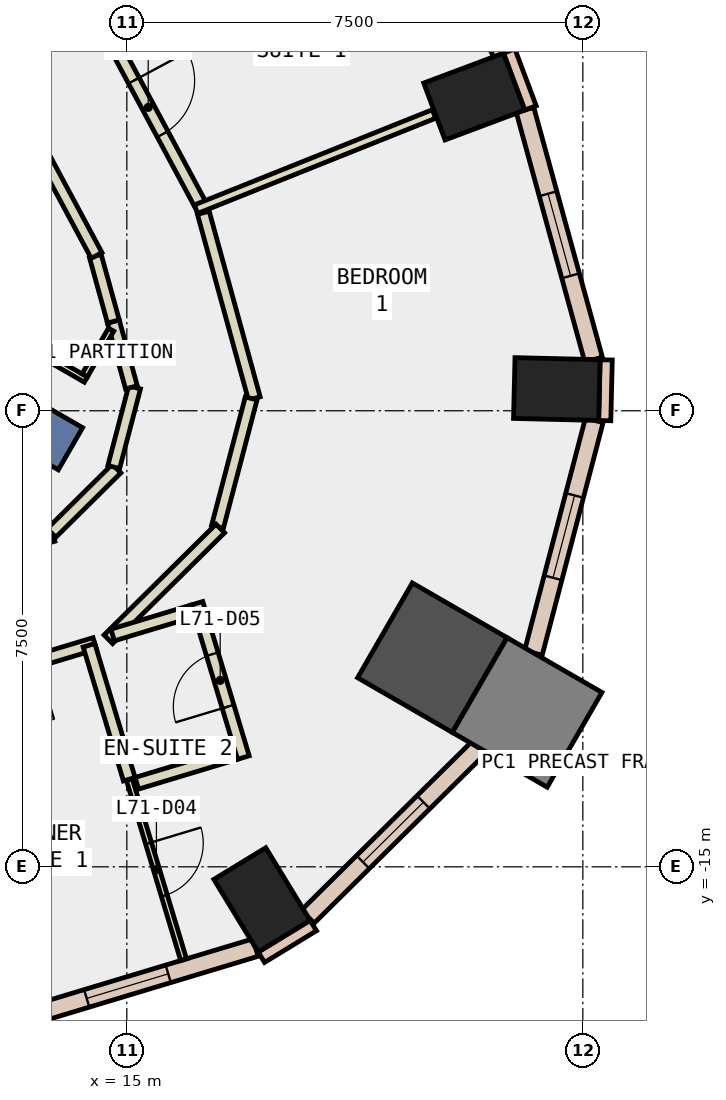
"""IFC4 building model, lengths in metres.
Left out: names, types, materials, properties, quantities, classifications, styles, units other than length and angle.
Written with IfcOpenShell. Run it as: python <this file> out.ifc"""

import sys

from ifc_helpers import new_model, si_unit, direction, frame, frame_2d, origin, origin_2d, place, context, subcontext, project, spatial, rectangle, extrude, element, fill, save


model = new_model("IFC4")
c1 = context("Model", 3, precision=1e-05, world=origin(), true_north=direction((0.0, 1.0)))
c2 = subcontext(c1, "Body", "Model", "MODEL_VIEW")
j1 = project(units=[si_unit("LENGTHUNIT", "METRE"), si_unit("PLANEANGLEUNIT", "RADIAN")], contexts=[c1])
p1 = place(None, origin())
s1 = spatial("IfcSite", under=j1, at=p1, CompositionType="ELEMENT")
p2 = place(p1, origin())
s2 = spatial("IfcBuilding", under=s1, at=p2, CompositionType="ELEMENT")
p3 = place(p2, frame((0.0, 0.0, 304.4)))
s3 = spatial("IfcBuildingStorey", under=s2, at=p3, CompositionType="ELEMENT", Elevation=304.4)
p4 = place(p3, frame((17.223, -15.544, -0.34), z_axis=(0.0, 0.0, 1.0), x_axis=(0.853650808213, 0.520845752251, 0.0)))
e1 = element("IfcColumn", 1, at=p4, inside=s3, PredefinedType="COLUMN", context=c2, shape_type="SweptSolid", body=[
    extrude(rectangle(XDim=1.0, YDim=1.4, at=origin_2d()), origin(), (0.0, 0.0, 1.0), 3.6),
])
p5 = place(p3, frame((20.025, -11.561, -0.34), z_axis=(0.0, 0.0, 1.0), x_axis=(-0.866025403784, 0.5, 0.0)))
e2 = element("IfcColumn", 2, at=p5, inside=s3, PredefinedType="COLUMN", context=c2, shape_type="SweptSolid", body=[
    extrude(rectangle(XDim=1.8, YDim=1.8, at=origin_2d()), origin(), (0.0, 0.0, 1.0), 3.6),
])
for number, where, z_axis, x_axis in (
    (3, (22.072, -7.143, -0.34), (0.0, 0.0, 1.0), (0.024, 1.0, 0.0)),
    (4, (20.714, -2.333, -0.34), (0.0, 0.0, 1.0), (-0.351, 0.936, 0.0)),
):
    element("IfcColumn", number, at=place(p3, frame(where, z_axis=z_axis, x_axis=x_axis)), inside=s3, PredefinedType="COLUMN", context=c2, shape_type="SweptSolid", body=[
        extrude(rectangle(XDim=1.0, YDim=1.4, at=origin_2d()), origin(), (0.0, 0.0, 1.0), 3.6),
    ])
p6 = place(p3, frame((21.584, -12.461, -0.34), z_axis=(0.0, 0.0, 1.0), x_axis=(-0.866025403784, 0.5, 0.0)))
e5 = element("IfcColumn", 5, at=p6, inside=s3, PredefinedType="COLUMN", context=c2, shape_type="SweptSolid", body=[
    extrude(rectangle(XDim=1.8, YDim=1.8, at=origin_2d()), origin(), (0.0, 0.0, 1.0), 3.6),
])
p7 = place(p3, frame((6.279, -3.625, -0.34), z_axis=(0.0, 0.0, 1.0), x_axis=(0.866017533419, -0.500013631625, 0.0)))
e6 = element("IfcWall", 6, at=p7, inside=s3, PredefinedType="SHEAR", context=c2, shape_type="SweptSolid", body=[
    extrude(rectangle(XDim=9.0, YDim=0.8, at=frame_2d((4.5, 0.0))), origin(), (0.0, 0.0, 1.0), 3.6),
])
p8 = place(p3, frame((21.639, -2.52, 0.0), z_axis=(0.0, 0.0, 1.0), x_axis=(-0.350962844851, 0.936389385637, 0.0)))
e7 = element("IfcWall", 7, at=p8, inside=s3, PredefinedType="STANDARD", context=c2, shape_type="SweptSolid", body=[
    extrude(rectangle(XDim=1.0, YDim=0.2, at=frame_2d((0.5, 0.0))), origin(), (0.0, 0.0, 1.0), 3.26),
])
p9 = place(p3, frame((17.213, -16.487, 0.0), z_axis=(0.0, 0.0, 1.0), x_axis=(0.853679739553, 0.520798331677, 0.0)))
e8 = element("IfcWall", 8, at=p9, inside=s3, PredefinedType="STANDARD", context=c2, shape_type="SweptSolid", body=[
    extrude(rectangle(XDim=1.0, YDim=0.2, at=frame_2d((0.5, 0.0))), origin(), (0.0, 0.0, 1.0), 3.26),
])
p10 = place(p3, frame((22.86, -7.662, 0.0), z_axis=(0.0, 0.0, 1.0), x_axis=(0.023942303888, 0.999713341956, 0.0)))
e9 = element("IfcWall", 9, at=p10, inside=s3, PredefinedType="STANDARD", context=c2, shape_type="SweptSolid", body=[
    extrude(rectangle(XDim=0.999, YDim=0.2, at=frame_2d((0.5, 0.0))), origin(), (0.0, 0.0, 1.0), 3.26),
])
p11 = place(p3, frame((12.904, -17.596, 0.0), z_axis=(0.0, 0.0, 1.0), x_axis=(0.957563190743, 0.288223412884, 0.0)))
e10 = element("IfcWall", 10, at=p11, inside=s3, PredefinedType="STANDARD", context=c2, shape_type="SweptSolid", body=[
    extrude(rectangle(XDim=4.4, YDim=0.3, at=frame_2d((2.2, 0.0))), origin(), (0.0, 0.0, 1.0), 3.26),
])
p12 = place(p11, frame((1.5, 0.0, 0.9)))
e11 = element("IfcOpeningElement", 11, at=p12, cuts=e10, PredefinedType="OPENING", context=c2, shape_type="SweptSolid", body=[
    extrude(rectangle(XDim=1.4, YDim=2.0, at=frame_2d((0.7, 1.0))), frame((0.0, 0.16, 0.0), z_axis=(0.0, -1.0, 0.0), x_axis=(1.0, 0.0, 0.0)), (0.0, 0.0, 1.0), 0.32),
])
p13 = place(p3, frame((17.976, -15.82, 0.0), z_axis=(0.0, 0.0, 1.0), x_axis=(0.710893699296, 0.703299472701, 0.0)))
e12 = element("IfcWall", 12, at=p13, inside=s3, PredefinedType="STANDARD", context=c2, shape_type="SweptSolid", body=[
    extrude(rectangle(XDim=3.954, YDim=0.3, at=frame_2d((1.977, 0.0))), origin(), (0.0, 0.0, 1.0), 3.26),
])
p14 = place(p13, frame((1.277, 0.0, 0.9)))
e13 = element("IfcOpeningElement", 13, at=p14, cuts=e12, PredefinedType="OPENING", context=c2, shape_type="SweptSolid", body=[
    extrude(rectangle(XDim=1.4, YDim=2.0, at=frame_2d((0.7, 1.0))), frame((0.0, 0.16, 0.0), z_axis=(0.0, -1.0, 0.0), x_axis=(1.0, 0.0, 0.0)), (0.0, 0.0, 1.0), 0.32),
])
p15 = place(p3, frame((21.686, -11.482, 0.0), z_axis=(0.0, 0.0, 1.0), x_axis=(0.253402039956, 0.96736105263, 0.0)))
e14 = element("IfcWall", 14, at=p15, inside=s3, PredefinedType="STANDARD", context=c2, shape_type="SweptSolid", body=[
    extrude(rectangle(XDim=3.954, YDim=0.3, at=frame_2d((1.977, 0.0))), origin(), (0.0, 0.0, 1.0), 3.26),
])
p16 = place(p15, frame((1.277, 0.0, 0.9)))
e15 = element("IfcOpeningElement", 15, at=p16, cuts=e14, PredefinedType="OPENING", context=c2, shape_type="SweptSolid", body=[
    extrude(rectangle(XDim=1.4, YDim=2.0, at=frame_2d((0.7, 1.0))), frame((0.0, 0.16, 0.0), z_axis=(0.0, -1.0, 0.0), x_axis=(1.0, 0.0, 0.0)), (0.0, 0.0, 1.0), 0.32),
])
p17 = place(p3, frame((22.677, -6.659, 0.0), z_axis=(0.0, 0.0, 1.0), x_axis=(-0.264892613927, 0.964277917971, 0.0)))
e16 = element("IfcWall", 16, at=p17, inside=s3, PredefinedType="STANDARD", context=c2, shape_type="SweptSolid", body=[
    extrude(rectangle(XDim=4.258, YDim=0.3, at=frame_2d((2.129, 0.0))), origin(), (0.0, 0.0, 1.0), 3.26),
])
p18 = place(p17, frame((1.429, 0.0, 0.9)))
e17 = element("IfcOpeningElement", 17, at=p18, cuts=e16, PredefinedType="OPENING", context=c2, shape_type="SweptSolid", body=[
    extrude(rectangle(XDim=1.4, YDim=2.0, at=frame_2d((0.7, 1.0))), frame((0.0, 0.16, 0.0), z_axis=(0.0, -1.0, 0.0), x_axis=(1.0, 0.0, 0.0)), (0.0, 0.0, 1.0), 0.32),
])
p19 = place(p3, frame((21.177, -1.626, 0.0), z_axis=(0.0, 0.0, 1.0), x_axis=(-0.473225522632, 0.880941317415, 0.0)))
e18 = element("IfcWall", 18, at=p19, inside=s3, PredefinedType="STANDARD", context=c2, shape_type="SweptSolid", body=[
    extrude(rectangle(XDim=7.345, YDim=0.3, at=frame_2d((3.673, 0.0))), origin(), (0.0, 0.0, 1.0), 3.26),
])
p20 = place(p19, frame((0.736, 0.0, 0.9)))
e19 = element("IfcOpeningElement", 19, at=p20, cuts=e18, PredefinedType="OPENING", context=c2, shape_type="SweptSolid", body=[
    extrude(rectangle(XDim=2.2, YDim=2.0, at=frame_2d((1.1, 1.0))), frame((0.0, 0.16, 0.0), z_axis=(0.0, -1.0, 0.0), x_axis=(1.0, 0.0, 0.0)), (0.0, 0.0, 1.0), 0.32),
])
p21 = place(p19, frame((4.409, 0.0, 0.9)))
e20 = element("IfcOpeningElement", 20, at=p21, cuts=e18, PredefinedType="OPENING", context=c2, shape_type="SweptSolid", body=[
    extrude(rectangle(XDim=2.2, YDim=2.0, at=frame_2d((1.1, 1.0))), frame((0.0, 0.16, 0.0), z_axis=(0.0, -1.0, 0.0), x_axis=(1.0, 0.0, 0.0)), (0.0, 0.0, 1.0), 0.32),
])
p22 = place(p3, frame((11.286, -10.303, 0.0), z_axis=(0.0, 0.0, 1.0), x_axis=(0.957555754851, 0.288248115955, 0.0)))
e21 = element("IfcWall", 21, at=p22, inside=s3, PredefinedType="PARTITIONING", context=c2, shape_type="SweptSolid", body=[
    extrude(rectangle(XDim=2.612, YDim=0.2, at=frame_2d((1.306, 0.0))), origin(), (0.0, 0.0, 1.0), 3.26),
])
p23 = place(p3, frame((13.762, -9.509, 0.0), z_axis=(0.0, 0.0, 1.0), x_axis=(0.710749293824, 0.703445407497, 0.0)))
e22 = element("IfcWall", 22, at=p23, inside=s3, PredefinedType="PARTITIONING", context=c2, shape_type="SweptSolid", body=[
    extrude(rectangle(XDim=1.504, YDim=0.2, at=frame_2d((0.752, 0.0))), origin(), (0.0, 0.0, 1.0), 3.26),
])
p24 = place(p3, frame((14.785, -8.425, 0.0), z_axis=(0.0, 0.0, 1.0), x_axis=(0.253295121261, 0.967389053869, 0.0)))
e23 = element("IfcWall", 23, at=p24, inside=s3, PredefinedType="PARTITIONING", context=c2, shape_type="SweptSolid", body=[
    extrude(rectangle(XDim=1.354, YDim=0.2, at=frame_2d((0.677, 0.0))), origin(), (0.0, 0.0, 1.0), 3.26),
])
p25 = place(p3, frame((15.076, -7.115, 0.0), z_axis=(0.0, 0.0, 1.0), x_axis=(-0.264368116744, 0.964421846937, 0.0)))
e24 = element("IfcWall", 24, at=p25, inside=s3, PredefinedType="PARTITIONING", context=c2, shape_type="SweptSolid", body=[
    extrude(rectangle(XDim=1.123, YDim=0.2, at=frame_2d((0.562, 0.0))), origin(), (0.0, 0.0, 1.0), 3.26),
])
p26 = place(p3, frame((14.779, -6.032, 0.0), z_axis=(0.0, 0.0, 1.0), x_axis=(-0.265740072272, 0.964044715762, 0.0)))
e25 = element("IfcWall", 25, at=p26, inside=s3, PredefinedType="PARTITIONING", context=c2, shape_type="SweptSolid", body=[
    extrude(rectangle(XDim=1.118, YDim=0.2, at=frame_2d((0.559, 0.0))), origin(), (0.0, 0.0, 1.0), 3.26),
])
p27 = place(p3, frame((14.503, -4.946, 0.0), z_axis=(0.0, 0.0, 1.0), x_axis=(-0.473101362557, 0.881008002658, 0.0)))
e26 = element("IfcWall", 26, at=p27, inside=s3, PredefinedType="PARTITIONING", context=c2, shape_type="SweptSolid", body=[
    extrude(rectangle(XDim=7.497, YDim=0.2, at=frame_2d((3.749, 0.0))), origin(), (0.0, 0.0, 1.0), 3.26),
])
p28 = place(p27, frame((3.249, 0.0, 0.0)))
e27 = element("IfcOpeningElement", 27, at=p28, cuts=e26, PredefinedType="OPENING", context=c2, shape_type="SweptSolid", body=[
    extrude(rectangle(XDim=1.0, YDim=2.1, at=frame_2d((0.5, 1.05))), frame((0.0, 0.11, 0.0), z_axis=(0.0, -1.0, 0.0), x_axis=(1.0, 0.0, 0.0)), (0.0, 0.0, 1.0), 0.22),
])
p29 = place(p3, frame((14.473, -11.328, 0.0), z_axis=(0.0, 0.0, 1.0), x_axis=(-0.957599689503, -0.288102125406, 0.0)))
e28 = element("IfcWall", 28, at=p29, inside=s3, PredefinedType="PARTITIONING", context=c2, shape_type="SweptSolid", body=[
    extrude(rectangle(XDim=2.999, YDim=0.2, at=frame_2d((1.5, 0.0))), origin(), (0.0, 0.0, 1.0), 3.26),
])
p30 = place(p29, frame((1.0, 0.0, 0.0)))
e29 = element("IfcOpeningElement", 29, at=p30, cuts=e28, PredefinedType="OPENING", context=c2, shape_type="SweptSolid", body=[
    extrude(rectangle(XDim=1.0, YDim=2.1, at=frame_2d((0.5, 1.05))), frame((0.0, 0.11, 0.0), z_axis=(0.0, -1.0, 0.0), x_axis=(1.0, 0.0, 0.0)), (0.0, 0.0, 1.0), 0.22),
])
p31 = place(p3, frame((16.258, -4.244, 0.0), z_axis=(0.0, 0.0, 1.0), x_axis=(0.264930673246, -0.964267462053, 0.0)))
e30 = element("IfcWall", 30, at=p31, inside=s3, PredefinedType="PARTITIONING", context=c2, shape_type="SweptSolid", body=[
    extrude(rectangle(XDim=3.166, YDim=0.2, at=frame_2d((1.583, 0.0))), origin(), (0.0, 0.0, 1.0), 3.26),
])
p32 = place(p3, frame((17.045, -7.297, 0.0), z_axis=(0.0, 0.0, 1.0), x_axis=(-0.253618393349, -0.967304352598, 0.0)))
e31 = element("IfcWall", 31, at=p32, inside=s3, PredefinedType="PARTITIONING", context=c2, shape_type="SweptSolid", body=[
    extrude(rectangle(XDim=2.184, YDim=0.2, at=frame_2d((1.092, 0.0))), origin(), (0.0, 0.0, 1.0), 3.26),
])
p33 = place(p3, frame((16.537, -9.436, 0.0), z_axis=(0.0, 0.0, 1.0), x_axis=(-0.710773151724, -0.703421301063, 0.0)))
e32 = element("IfcWall", 32, at=p33, inside=s3, PredefinedType="PARTITIONING", context=c2, shape_type="SweptSolid", body=[
    extrude(rectangle(XDim=2.59, YDim=0.2, at=frame_2d((1.295, 0.0))), origin(), (0.0, 0.0, 1.0), 3.26),
])
p34 = place(p3, frame((14.461, -0.852, 0.0), z_axis=(0.0, 0.0, 1.0), x_axis=(0.473160180459, -0.88097641491, 0.0)))
e33 = element("IfcWall", 33, at=p34, inside=s3, PredefinedType="PARTITIONING", context=c2, shape_type="SweptSolid", body=[
    extrude(rectangle(XDim=3.766, YDim=0.2, at=frame_2d((1.883, 0.0))), origin(), (0.0, 0.0, 1.0), 3.26),
])
p35 = place(p34, frame((1.383, 0.0, 0.0)))
e34 = element("IfcOpeningElement", 34, at=p35, cuts=e33, PredefinedType="OPENING", context=c2, shape_type="SweptSolid", body=[
    extrude(rectangle(XDim=1.0, YDim=2.1, at=frame_2d((0.5, 1.05))), frame((0.0, 0.11, 0.0), z_axis=(0.0, -1.0, 0.0), x_axis=(1.0, 0.0, 0.0)), (0.0, 0.0, 1.0), 0.22),
])
p36 = place(p3, frame((6.835, -2.662, 0.0), z_axis=(0.0, 0.0, 1.0), x_axis=(0.866023427642, -0.500003422764, 0.0)))
e35 = element("IfcWall", 35, at=p36, inside=s3, PredefinedType="PARTITIONING", context=c2, shape_type="SweptSolid", body=[
    extrude(rectangle(XDim=8.65, YDim=0.1, at=frame_2d((4.325, 0.0))), origin(), (0.0, 0.0, 1.0), 3.26),
])
p37 = place(p3, frame((14.307, -6.919, 0.0), z_axis=(0.0, 0.0, 1.0), x_axis=(0.500305662732, 0.865848857387, 0.0)))
e36 = element("IfcWall", 36, at=p37, inside=s3, PredefinedType="PARTITIONING", context=c2, shape_type="SweptSolid", body=[
    extrude(rectangle(XDim=0.87, YDim=0.1, at=frame_2d((0.435, 0.0))), origin(), (0.0, 0.0, 1.0), 3.26),
])
p38 = place(p3, frame((15.04, -13.559, 0.0), z_axis=(0.0, 0.0, 1.0), x_axis=(0.288337370875, -0.957528882362, 0.0)))
e37 = element("IfcWall", 37, at=p38, inside=s3, PredefinedType="PARTITIONING", context=c2, shape_type="SweptSolid", body=[
    extrude(rectangle(XDim=3.101, YDim=0.1, at=frame_2d((1.55, 0.0))), origin(), (0.0, 0.0, 1.0), 3.26),
])
p39 = place(p38, frame((1.1, 0.0, 0.0)))
e38 = element("IfcOpeningElement", 38, at=p39, cuts=e37, PredefinedType="OPENING", context=c2, shape_type="SweptSolid", body=[
    extrude(rectangle(XDim=0.9, YDim=2.1, at=frame_2d((0.45, 1.05))), frame((0.0, 0.06, 0.0), z_axis=(0.0, -1.0, 0.0), x_axis=(1.0, 0.0, 0.0)), (0.0, 0.0, 1.0), 0.12),
])
p40 = place(p3, frame((14.378, -11.357, 0.0), z_axis=(0.0, 0.0, 1.0), x_axis=(0.287932252498, -0.957650780802, 0.0)))
e39 = element("IfcWall", 39, at=p40, inside=s3, PredefinedType="PARTITIONING", context=c2, shape_type="SweptSolid", body=[
    extrude(rectangle(XDim=2.3, YDim=0.2, at=frame_2d((1.15, 0.0))), origin(), (0.0, 0.0, 1.0), 3.26),
])
p41 = place(p3, frame((15.165, -13.626, 0.0), z_axis=(0.0, 0.0, 1.0), x_axis=(0.957565028189, 0.288217308275, 0.0)))
e40 = element("IfcWall", 40, at=p41, inside=s3, PredefinedType="PARTITIONING", context=c2, shape_type="SweptSolid", body=[
    extrude(rectangle(XDim=1.7, YDim=0.2, at=frame_2d((0.85, 0.0))), origin(), (0.0, 0.0, 1.0), 3.26),
])
p42 = place(p3, frame((16.917, -13.203, 0.0), z_axis=(0.0, 0.0, 1.0), x_axis=(-0.287998855134, 0.957630753183, 0.0)))
e41 = element("IfcWall", 41, at=p42, inside=s3, PredefinedType="PARTITIONING", context=c2, shape_type="SweptSolid", body=[
    extrude(rectangle(XDim=2.649, YDim=0.2, at=frame_2d((1.325, 0.0))), origin(), (0.0, 0.0, 1.0), 3.26),
])
p43 = place(p42, frame((0.875, 0.0, 0.0)))
e42 = element("IfcOpeningElement", 42, at=p43, cuts=e41, PredefinedType="OPENING", context=c2, shape_type="SweptSolid", body=[
    extrude(rectangle(XDim=0.9, YDim=2.1, at=frame_2d((0.45, 1.05))), frame((0.0, 0.11, 0.0), z_axis=(0.0, -1.0, 0.0), x_axis=(1.0, 0.0, 0.0)), (0.0, 0.0, 1.0), 0.22),
])
p44 = place(p3, frame((16.087, -10.79, 0.0), z_axis=(0.0, 0.0, 1.0), x_axis=(-0.957425655367, -0.288679951581, 0.0)))
e43 = element("IfcWall", 43, at=p44, inside=s3, PredefinedType="PARTITIONING", context=c2, shape_type="SweptSolid", body=[
    extrude(rectangle(XDim=1.378, YDim=0.2, at=frame_2d((0.689, 0.0))), origin(), (0.0, 0.0, 1.0), 3.26),
])
p45 = place(p3, frame((16.138, -4.185, 0.0), z_axis=(0.0, 0.0, 1.0), x_axis=(0.928432751736, 0.371500505388, 0.0)))
e44 = element("IfcWall", 44, at=p45, inside=s3, PredefinedType="PARTITIONING", context=c2, shape_type="SweptSolid", body=[
    extrude(rectangle(XDim=4.216, YDim=0.15, at=frame_2d((2.108, 0.0))), origin(), (0.0, 0.0, 1.0), 3.26),
])
p46 = place(p12, origin())
e45 = element("IfcWindow", 45, at=p46, inside=s3, PartitioningType="SINGLE_PANEL", PredefinedType="WINDOW", context=c2, shape_type="SweptSolid", body=[
    extrude(rectangle(XDim=1.4, YDim=2.0, at=frame_2d((0.7, 1.0))), frame((0.0, 0.03, 0.0), z_axis=(0.0, -1.0, 0.0), x_axis=(1.0, 0.0, 0.0)), (0.0, 0.0, 1.0), 0.06),
])
fill(e11, e45)
p47 = place(p14, origin())
e46 = element("IfcWindow", 46, at=p47, inside=s3, PartitioningType="SINGLE_PANEL", PredefinedType="WINDOW", context=c2, shape_type="SweptSolid", body=[
    extrude(rectangle(XDim=1.4, YDim=2.0, at=frame_2d((0.7, 1.0))), frame((0.0, 0.03, 0.0), z_axis=(0.0, -1.0, 0.0), x_axis=(1.0, 0.0, 0.0)), (0.0, 0.0, 1.0), 0.06),
])
fill(e13, e46)
p48 = place(p16, origin())
e47 = element("IfcWindow", 47, at=p48, inside=s3, PartitioningType="SINGLE_PANEL", PredefinedType="WINDOW", context=c2, shape_type="SweptSolid", body=[
    extrude(rectangle(XDim=1.4, YDim=2.0, at=frame_2d((0.7, 1.0))), frame((0.0, 0.03, 0.0), z_axis=(0.0, -1.0, 0.0), x_axis=(1.0, 0.0, 0.0)), (0.0, 0.0, 1.0), 0.06),
])
fill(e15, e47)
p49 = place(p18, origin())
e48 = element("IfcWindow", 48, at=p49, inside=s3, PartitioningType="SINGLE_PANEL", PredefinedType="WINDOW", context=c2, shape_type="SweptSolid", body=[
    extrude(rectangle(XDim=1.4, YDim=2.0, at=frame_2d((0.7, 1.0))), frame((0.0, 0.03, 0.0), z_axis=(0.0, -1.0, 0.0), x_axis=(1.0, 0.0, 0.0)), (0.0, 0.0, 1.0), 0.06),
])
fill(e17, e48)
p50 = place(p39, origin())
e49 = element("IfcDoor", 49, at=p50, inside=s3, OperationType="SINGLE_SWING_LEFT", PredefinedType="DOOR", context=c2, shape_type="SweptSolid", body=[
    extrude(rectangle(XDim=0.9, YDim=2.1, at=frame_2d((0.45, 1.05))), frame((0.0, 0.025, 0.0), z_axis=(0.0, -1.0, 0.0), x_axis=(1.0, 0.0, 0.0)), (0.0, 0.0, 1.0), 0.05),
])
fill(e38, e49)
p51 = place(p43, origin())
e50 = element("IfcDoor", 50, at=p51, inside=s3, OperationType="SINGLE_SWING_LEFT", PredefinedType="DOOR", context=c2, shape_type="SweptSolid", body=[
    extrude(rectangle(XDim=0.9, YDim=2.1, at=frame_2d((0.45, 1.05))), frame((0.0, 0.025, 0.0), z_axis=(0.0, -1.0, 0.0), x_axis=(1.0, 0.0, 0.0)), (0.0, 0.0, 1.0), 0.05),
])
fill(e42, e50)
p52 = place(p35, origin())
e51 = element("IfcDoor", 51, at=p52, inside=s3, OperationType="SINGLE_SWING_LEFT", PredefinedType="DOOR", context=c2, shape_type="SweptSolid", body=[
    extrude(rectangle(XDim=1.0, YDim=2.1, at=frame_2d((0.5, 1.05))), frame((0.0, 0.025, 0.0), z_axis=(0.0, -1.0, 0.0), x_axis=(1.0, 0.0, 0.0)), (0.0, 0.0, 1.0), 0.05),
])
fill(e34, e51)
save(model, sys.argv[1])
